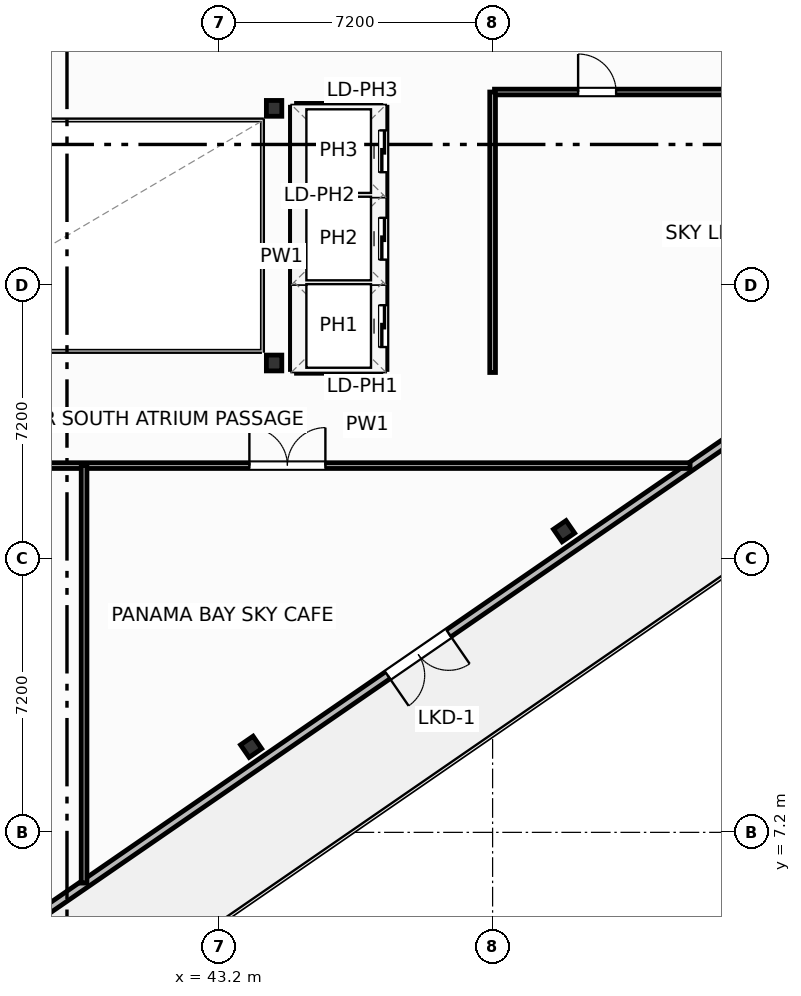
"""IFC4 building model, lengths in metres.
Left out: names, types, materials, properties, quantities, classifications, styles, units other than length and angle.
Written with IfcOpenShell. Run it as: python <this file> out.ifc"""

import sys

from ifc_helpers import new_model, si_unit, direction, frame, frame_2d, origin, origin_2d, place, context, subcontext, project, spatial, rectangle, i_section, extrude, element, fill, save


model = new_model("IFC4")
c1 = context("Model", 3, precision=1e-05, world=origin(), true_north=direction((0.0, 1.0)))
c2 = subcontext(c1, "Body", "Model", "MODEL_VIEW")
j1 = project(units=[si_unit("LENGTHUNIT", "METRE"), si_unit("PLANEANGLEUNIT", "RADIAN")], contexts=[c1])
p1 = place(None, origin())
s1 = spatial("IfcSite", under=j1, at=p1, CompositionType="ELEMENT")
p2 = place(p1, origin())
s2 = spatial("IfcBuilding", under=s1, at=p2, CompositionType="ELEMENT")
p3 = place(p2, frame((0.0, 0.0, 296.3)))
s3 = spatial("IfcBuildingStorey", under=s2, at=p3, CompositionType="ELEMENT", Elevation=296.3)
for number, where, z_axis, x_axis in (
    (1, (44.65, 19.55, 0.0), (0.0, 0.0, 1.0), (1.0, 0.0, 0.0)),
    (2, (44.65, 26.25, 0.0), (0.0, 0.0, 1.0), (1.0, 0.0, 0.0)),
):
    element("IfcColumn", number, at=place(p3, frame(where, z_axis=z_axis, x_axis=x_axis)), inside=s3, PredefinedType="COLUMN", context=c2, shape_type="SweptSolid", body=[
        extrude(i_section(OverallWidth=0.406, OverallDepth=0.416, WebThickness=0.03, FlangeThickness=0.048, FilletRadius=0.025, at=origin_2d()), origin(), (0.0, 0.0, 1.0), 4.8),
    ])
for number, where, z_axis, x_axis in (
    (3, (44.045, 9.452, -0.32), (0.0, 0.0, 1.0), (0.824, 0.567, 0.0)),
    (4, (52.281, 15.125, -0.32), (0.0, 0.0, 1.0), (0.824, 0.567, 0.0)),
):
    element("IfcColumn", number, at=place(p3, frame(where, z_axis=z_axis, x_axis=x_axis)), inside=s3, PredefinedType="COLUMN", context=c2, shape_type="SweptSolid", body=[
        extrude(i_section(OverallWidth=0.401, OverallDepth=0.399, WebThickness=0.025, FlangeThickness=0.04, FilletRadius=0.022, at=origin_2d()), origin(), (0.0, 0.0, 1.0), 5.12),
    ])
p4 = place(p3, frame((64.912, 23.23, 0.0), z_axis=(0.0, 0.0, 1.0), x_axis=(-0.823534403617, -0.567266327275, 0.0)))
e5 = element("IfcWall", 5, at=p4, inside=s3, PredefinedType="SOLIDWALL", context=c2, shape_type="SweptSolid", body=[
    extrude(rectangle(XDim=40.0, YDim=0.22, at=frame_2d((20.0, 0.0))), origin(), (0.0, 0.0, 1.0), 3.83),
])
p5 = place(p4, frame((19.025, 0.0, 0.0)))
e6 = element("IfcOpeningElement", 6, at=p5, cuts=e5, PredefinedType="OPENING", context=c2, shape_type="SweptSolid", body=[
    extrude(rectangle(XDim=1.95, YDim=2.35, at=frame_2d((0.975, 1.175))), frame((0.0, 0.12, 0.0), z_axis=(0.0, -1.0, 0.0), x_axis=(1.0, 0.0, 0.0)), (0.0, 0.0, 1.0), 0.24),
])
p6 = place(p4, frame((0.55, 0.0, 0.75)))
e7 = element("IfcOpeningElement", 7, at=p6, cuts=e5, PredefinedType="OPENING", context=c2, shape_type="SweptSolid", body=[
    extrude(rectangle(XDim=2.6, YDim=2.0, at=frame_2d((1.3, 1.0))), frame((0.0, 0.12, 0.0), z_axis=(0.0, -1.0, 0.0), x_axis=(1.0, 0.0, 0.0)), (0.0, 0.0, 1.0), 0.24),
])
p7 = place(p4, frame((36.85, 0.0, 0.75)))
e8 = element("IfcOpeningElement", 8, at=p7, cuts=e5, PredefinedType="OPENING", context=c2, shape_type="SweptSolid", body=[
    extrude(rectangle(XDim=2.6, YDim=2.0, at=frame_2d((1.3, 1.0))), frame((0.0, 0.12, 0.0), z_axis=(0.0, -1.0, 0.0), x_axis=(1.0, 0.0, 0.0)), (0.0, 0.0, 1.0), 0.24),
])
p8 = place(p3, frame((13.489, 27.37, 0.0), z_axis=(0.0, 0.0, 1.0), x_axis=(0.823532439547, 0.567269178622, 0.0)))
e9 = element("IfcWall", 9, at=p8, inside=s3, PredefinedType="SOLIDWALL", context=c2, shape_type="SweptSolid", body=[
    extrude(rectangle(XDim=40.0, YDim=0.22, at=frame_2d((20.0, 0.0))), origin(), (0.0, 0.0, 1.0), 3.83),
])
p9 = place(p8, frame((25.598, 0.0, 0.0)))
e10 = element("IfcOpeningElement", 10, at=p9, cuts=e9, PredefinedType="OPENING", context=c2, shape_type="SweptSolid", body=[
    extrude(rectangle(XDim=1.95, YDim=2.35, at=frame_2d((0.975, 1.175))), frame((0.0, 0.12, 0.0), z_axis=(0.0, -1.0, 0.0), x_axis=(1.0, 0.0, 0.0)), (0.0, 0.0, 1.0), 0.24),
])
p10 = place(p8, frame((0.55, 0.0, 0.75)))
e11 = element("IfcOpeningElement", 11, at=p10, cuts=e9, PredefinedType="OPENING", context=c2, shape_type="SweptSolid", body=[
    extrude(rectangle(XDim=2.6, YDim=2.0, at=frame_2d((1.3, 1.0))), frame((0.0, 0.12, 0.0), z_axis=(0.0, -1.0, 0.0), x_axis=(1.0, 0.0, 0.0)), (0.0, 0.0, 1.0), 0.24),
])
p11 = place(p8, frame((36.85, 0.0, 0.75)))
e12 = element("IfcOpeningElement", 12, at=p11, cuts=e9, PredefinedType="OPENING", context=c2, shape_type="SweptSolid", body=[
    extrude(rectangle(XDim=2.6, YDim=2.0, at=frame_2d((1.3, 1.0))), frame((0.0, 0.12, 0.0), z_axis=(0.0, -1.0, 0.0), x_axis=(1.0, 0.0, 0.0)), (0.0, 0.0, 1.0), 0.24),
])
p12 = place(p3, frame((13.659, 16.85, 0.0), z_axis=(0.0, 0.0, 1.0), x_axis=(1.0, 0.0, 0.0)))
e13 = element("IfcWall", 13, at=p12, inside=s3, PredefinedType="PARTITIONING", context=c2, shape_type="SweptSolid", body=[
    extrude(rectangle(XDim=41.937, YDim=0.15, at=frame_2d((20.969, 0.0))), origin(), (0.0, 0.0, 1.0), 3.839),
])
p13 = place(p12, frame((8.275, 0.0, 0.0)))
e14 = element("IfcOpeningElement", 14, at=p13, cuts=e13, PredefinedType="OPENING", context=c2, shape_type="SweptSolid", body=[
    extrude(rectangle(XDim=2.0, YDim=2.05, at=frame_2d((1.0, 1.025))), frame((0.0, 0.085, 0.0), z_axis=(0.0, -1.0, 0.0), x_axis=(1.0, 0.0, 0.0)), (0.0, 0.0, 1.0), 0.17),
])
p14 = place(p12, frame((30.341, 0.0, 0.0)))
e15 = element("IfcOpeningElement", 15, at=p14, cuts=e13, PredefinedType="OPENING", context=c2, shape_type="SweptSolid", body=[
    extrude(rectangle(XDim=2.0, YDim=2.05, at=frame_2d((1.0, 1.025))), frame((0.0, 0.085, 0.0), z_axis=(0.0, -1.0, 0.0), x_axis=(1.0, 0.0, 0.0)), (0.0, 0.0, 1.0), 0.17),
])
p15 = place(p3, frame((39.65, 5.866, 0.0), z_axis=(0.0, 0.0, 1.0), x_axis=(0.0, 1.0, 0.0)))
e16 = element("IfcWall", 16, at=p15, inside=s3, PredefinedType="PARTITIONING", context=c2, shape_type="SweptSolid", body=[
    extrude(rectangle(XDim=10.984, YDim=0.15, at=frame_2d((5.492, 0.0))), origin(), (0.0, 0.0, 1.0), 4.55),
])
p16 = place(p3, frame((50.45, 26.68, 0.0), z_axis=(0.0, 0.0, 1.0), x_axis=(1.0, 0.0, 0.0)))
e17 = element("IfcWall", 17, at=p16, inside=s3, PredefinedType="PARTITIONING", context=c2, shape_type="SweptSolid", body=[
    extrude(rectangle(XDim=15.55, YDim=0.15, at=frame_2d((7.775, 0.0))), origin(), (0.0, 0.0, 1.0), 4.55),
])
p17 = place(p16, frame((2.2, 0.0, 0.0)))
e18 = element("IfcOpeningElement", 18, at=p17, cuts=e17, PredefinedType="OPENING", context=c2, shape_type="SweptSolid", body=[
    extrude(rectangle(XDim=1.0, YDim=2.05, at=frame_2d((0.5, 1.025))), frame((0.0, 0.085, 0.0), z_axis=(0.0, -1.0, 0.0), x_axis=(1.0, 0.0, 0.0)), (0.0, 0.0, 1.0), 0.17),
])
p18 = place(p3, frame((50.4, 19.3, 0.0), z_axis=(0.0, 0.0, 1.0), x_axis=(0.0, 1.0, 0.0)))
e19 = element("IfcWall", 19, at=p18, inside=s3, PredefinedType="PARTITIONING", context=c2, shape_type="SweptSolid", body=[
    extrude(rectangle(XDim=7.38, YDim=0.15, at=frame_2d((3.69, 0.0))), origin(), (0.0, 0.0, 1.0), 4.55),
])
for number, where, z_axis, x_axis in (
    (20, (45.24, 21.675, 0.0), (0.0, 0.0, 1.0), (1.0, 0.0, 0.0)),
    (21, (45.24, 23.975, 0.0), (0.0, 0.0, 1.0), (1.0, 0.0, 0.0)),
    (22, (45.24, 19.38, 0.0), (0.0, 0.0, 1.0), (1.0, 0.0, 0.0)),
    (23, (45.24, 26.28, 0.0), (0.0, 0.0, 1.0), (1.0, 0.0, 0.0)),
):
    element("IfcWall", number, at=place(p3, frame(where, z_axis=z_axis, x_axis=x_axis)), inside=s3, PredefinedType="PARTITIONING", context=c2, shape_type="SweptSolid", body=[
        extrude(rectangle(XDim=2.22, YDim=0.2, at=frame_2d((1.11, 0.0))), origin(), (0.0, 0.0, 1.0), 4.55),
    ])
p19 = place(p3, frame((45.18, 19.38, 0.0), z_axis=(0.0, 0.0, 1.0), x_axis=(0.0, 1.0, 0.0)))
e24 = element("IfcWall", 24, at=p19, inside=s3, PredefinedType="PARTITIONING", context=c2, shape_type="SweptSolid", body=[
    extrude(rectangle(XDim=6.9, YDim=0.2, at=frame_2d((3.45, 0.0))), origin(), (0.0, 0.0, 1.0), 4.55),
])
p20 = place(p3, frame((47.52, 19.38, 0.0), z_axis=(0.0, 0.0, 1.0), x_axis=(0.0, 1.0, 0.0)))
e25 = element("IfcWall", 25, at=p20, inside=s3, PredefinedType="PARTITIONING", context=c2, shape_type="SweptSolid", body=[
    extrude(rectangle(XDim=6.9, YDim=0.2, at=frame_2d((3.45, 0.0))), origin(), (0.0, 0.0, 1.0), 4.55),
])
p21 = place(p20, frame((0.59, 0.0, 0.0)))
e26 = element("IfcOpeningElement", 26, at=p21, cuts=e25, PredefinedType="OPENING", context=c2, shape_type="SweptSolid", body=[
    extrude(rectangle(XDim=1.1, YDim=2.15, at=frame_2d((0.55, 1.075))), frame((0.0, 0.11, 0.0), z_axis=(0.0, -1.0, 0.0), x_axis=(1.0, 0.0, 0.0)), (0.0, 0.0, 1.0), 0.22),
])
p22 = place(p20, frame((2.89, 0.0, 0.0)))
e27 = element("IfcOpeningElement", 27, at=p22, cuts=e25, PredefinedType="OPENING", context=c2, shape_type="SweptSolid", body=[
    extrude(rectangle(XDim=1.1, YDim=2.15, at=frame_2d((0.55, 1.075))), frame((0.0, 0.11, 0.0), z_axis=(0.0, -1.0, 0.0), x_axis=(1.0, 0.0, 0.0)), (0.0, 0.0, 1.0), 0.22),
])
p23 = place(p20, frame((5.19, 0.0, 0.0)))
e28 = element("IfcOpeningElement", 28, at=p23, cuts=e25, PredefinedType="OPENING", context=c2, shape_type="SweptSolid", body=[
    extrude(rectangle(XDim=1.1, YDim=2.15, at=frame_2d((0.55, 1.075))), frame((0.0, 0.11, 0.0), z_axis=(0.0, -1.0, 0.0), x_axis=(1.0, 0.0, 0.0)), (0.0, 0.0, 1.0), 0.22),
])
p24 = place(p5, origin())
e29 = element("IfcDoor", 29, at=p24, inside=s3, OperationType="DOUBLE_DOOR_SINGLE_SWING", PredefinedType="DOOR", context=c2, shape_type="SweptSolid", body=[
    extrude(rectangle(XDim=1.95, YDim=2.35, at=frame_2d((0.975, 1.175))), frame((0.0, 0.025, 0.0), z_axis=(0.0, -1.0, 0.0), x_axis=(1.0, 0.0, 0.0)), (0.0, 0.0, 1.0), 0.05),
])
fill(e6, e29)
p25 = place(p14, origin())
e30 = element("IfcDoor", 30, at=p25, inside=s3, OperationType="DOUBLE_DOOR_SINGLE_SWING", PredefinedType="DOOR", context=c2, shape_type="SweptSolid", body=[
    extrude(rectangle(XDim=2.0, YDim=2.05, at=frame_2d((1.0, 1.025))), frame((0.0, 0.025, 0.0), z_axis=(0.0, -1.0, 0.0), x_axis=(1.0, 0.0, 0.0)), (0.0, 0.0, 1.0), 0.05),
])
fill(e15, e30)
p26 = place(p17, origin())
e31 = element("IfcDoor", 31, at=p26, inside=s3, OperationType="SINGLE_SWING_LEFT", PredefinedType="DOOR", context=c2, shape_type="SweptSolid", body=[
    extrude(rectangle(XDim=1.0, YDim=2.05, at=frame_2d((0.5, 1.025))), frame((0.0, 0.025, 0.0), z_axis=(0.0, -1.0, 0.0), x_axis=(1.0, 0.0, 0.0)), (0.0, 0.0, 1.0), 0.05),
])
fill(e18, e31)
p27 = place(p21, origin())
e32 = element("IfcDoor", 32, at=p27, inside=s3, OperationType="SLIDING_TO_LEFT", PredefinedType="DOOR", context=c2, shape_type="SweptSolid", body=[
    extrude(rectangle(XDim=1.1, YDim=2.15, at=frame_2d((0.55, 1.075))), frame((0.0, 0.025, 0.0), z_axis=(0.0, -1.0, 0.0), x_axis=(1.0, 0.0, 0.0)), (0.0, 0.0, 1.0), 0.05),
])
fill(e26, e32)
p28 = place(p22, origin())
e33 = element("IfcDoor", 33, at=p28, inside=s3, OperationType="SLIDING_TO_LEFT", PredefinedType="DOOR", context=c2, shape_type="SweptSolid", body=[
    extrude(rectangle(XDim=1.1, YDim=2.15, at=frame_2d((0.55, 1.075))), frame((0.0, 0.025, 0.0), z_axis=(0.0, -1.0, 0.0), x_axis=(1.0, 0.0, 0.0)), (0.0, 0.0, 1.0), 0.05),
])
fill(e27, e33)
p29 = place(p23, origin())
e34 = element("IfcDoor", 34, at=p29, inside=s3, OperationType="SLIDING_TO_LEFT", PredefinedType="DOOR", context=c2, shape_type="SweptSolid", body=[
    extrude(rectangle(XDim=1.1, YDim=2.15, at=frame_2d((0.55, 1.075))), frame((0.0, 0.025, 0.0), z_axis=(0.0, -1.0, 0.0), x_axis=(1.0, 0.0, 0.0)), (0.0, 0.0, 1.0), 0.05),
])
fill(e28, e34)
save(model, sys.argv[1])
